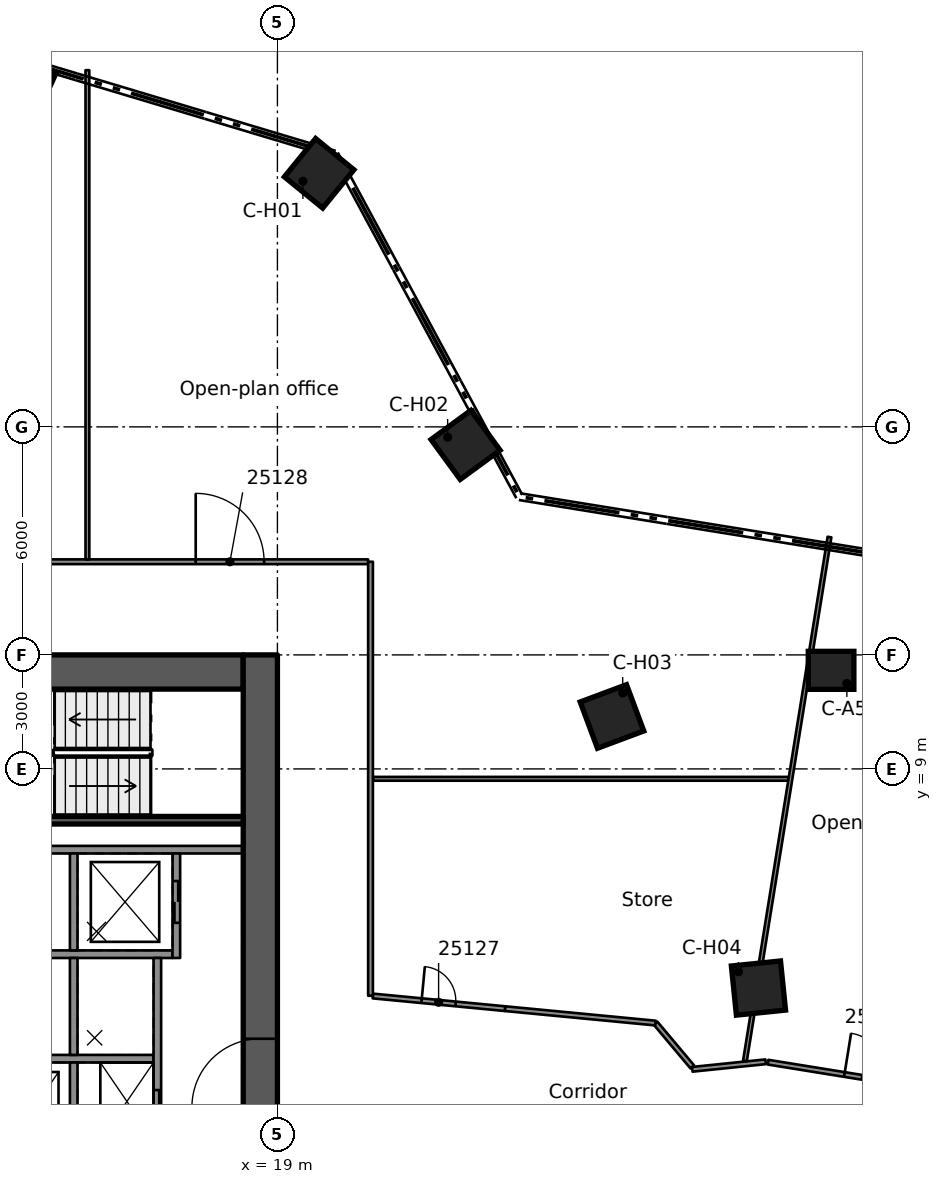
"""IFC4 building model, lengths in metres.
Left out: names, types, materials, properties, quantities, classifications, styles, units other than length and angle.
Written with IfcOpenShell. Run it as: python <this file> out.ifc"""

import sys

from ifc_helpers import new_model, si_unit, direction, frame, frame_2d, origin, origin_2d, place, context, subcontext, project, spatial, rectangle, extrude, element, fill, save


model = new_model("IFC4")
c1 = context("Model", 3, precision=1e-05, world=origin(), true_north=direction((0.0, 1.0)))
c2 = subcontext(c1, "Body", "Model", "MODEL_VIEW")
j1 = project(units=[si_unit("LENGTHUNIT", "METRE"), si_unit("PLANEANGLEUNIT", "RADIAN")], contexts=[c1])
p1 = place(None, origin())
s1 = spatial("IfcSite", under=j1, at=p1, CompositionType="ELEMENT")
p2 = place(p1, origin())
s2 = spatial("IfcBuilding", under=s1, at=p2, CompositionType="ELEMENT")
p3 = place(p2, frame((0.0, 0.0, 127.2)))
s3 = spatial("IfcBuildingStorey", under=s2, at=p3, CompositionType="ELEMENT", Elevation=127.2)
p4 = place(p3, frame((8.9, 11.55, 0.0), z_axis=(0.0, 0.0, 1.0), x_axis=(1.0, 0.0, 0.0)))
e1 = element("IfcWall", 1, at=p4, inside=s3, PredefinedType="SHEAR", context=c2, shape_type="SweptSolid", body=[
    extrude(rectangle(XDim=9.2, YDim=0.9, at=frame_2d((4.6, 0.0))), origin(), (0.0, 0.0, 1.0), 3.5),
])
p5 = place(p4, frame((3.0, 0.0, 0.0)))
e2 = element("IfcOpeningElement", 2, at=p5, cuts=e1, PredefinedType="OPENING", context=c2, shape_type="SweptSolid", body=[
    extrude(rectangle(XDim=1.1, YDim=2.1, at=frame_2d((0.55, 1.05))), frame((0.0, 0.46, 0.0), z_axis=(0.0, -1.0, 0.0), x_axis=(1.0, 0.0, 0.0)), (0.0, 0.0, 1.0), 0.92),
])
p6 = place(p4, frame((0.77, 0.0, 0.0)))
e3 = element("IfcOpeningElement", 3, at=p6, cuts=e1, PredefinedType="OPENING", context=c2, shape_type="SweptSolid", body=[
    extrude(rectangle(XDim=0.9, YDim=2.1, at=frame_2d((0.45, 1.05))), frame((0.0, 0.46, 0.0), z_axis=(0.0, -1.0, 0.0), x_axis=(1.0, 0.0, 0.0)), (0.0, 0.0, 1.0), 0.92),
])
p7 = place(p3, frame((18.55, -12.0, 0.0), z_axis=(0.0, 0.0, 1.0), x_axis=(0.0, 1.0, 0.0)))
e4 = element("IfcWall", 4, at=p7, inside=s3, PredefinedType="SHEAR", context=c2, shape_type="SweptSolid", body=[
    extrude(rectangle(XDim=24.0, YDim=0.9, at=frame_2d((12.0, 0.0))), origin(), (0.0, 0.0, 1.0), 3.5),
])
p8 = place(p7, frame((12.1, 0.0, 0.0)))
e5 = element("IfcOpeningElement", 5, at=p8, cuts=e4, PredefinedType="OPENING", context=c2, shape_type="SweptSolid", body=[
    extrude(rectangle(XDim=1.8, YDim=2.1, at=frame_2d((0.9, 1.05))), frame((0.0, 0.46, 0.0), z_axis=(0.0, -1.0, 0.0), x_axis=(1.0, 0.0, 0.0)), (0.0, 0.0, 1.0), 0.92),
])
p9 = place(p3, frame((33.569, 11.594, 0.0), z_axis=(0.0, 0.0, 1.0), x_axis=(1.0, 0.0, 0.0)))
e6 = element("IfcColumn", 6, at=p9, inside=s3, PredefinedType="COLUMN", context=c2, shape_type="SweptSolid", body=[
    extrude(rectangle(XDim=1.2, YDim=1.0, at=origin_2d()), origin(), (0.0, 0.0, 1.0), 3.5),
])
for number, where, z_axis, x_axis in (
    (7, (20.098, 24.672, 0.0), (0.0, 0.0, 1.0), (0.632, 0.775, 0.0)),
    (8, (23.951, 17.526, 0.0), (0.0, 0.0, 1.0), (0.807, 0.591, 0.0)),
    (9, (27.804, 10.38, 0.0), (0.0, 0.0, 1.0), (0.937, 0.35, 0.0)),
    (10, (31.658, 3.234, 0.0), (0.0, 0.0, 1.0), (0.995, 0.102, 0.0)),
    (11, (12.321, 27.001, 0.0), (0.0, 0.0, 1.0), (0.415, 0.91, 0.0)),
):
    element("IfcColumn", number, at=place(p3, frame(where, z_axis=z_axis, x_axis=x_axis)), inside=s3, PredefinedType="COLUMN", context=c2, shape_type="SweptSolid", body=[
        extrude(rectangle(XDim=1.3, YDim=1.3, at=origin_2d()), origin(), (0.0, 0.0, 1.0), 3.5),
    ])
p10 = place(p3, frame((11.54, 6.875, 0.0), z_axis=(0.0, 0.0, 1.0), x_axis=(1.0, 0.0, 0.0)))
e12 = element("IfcWall", 12, at=p10, inside=s3, PredefinedType="SOLIDWALL", context=c2, shape_type="SweptSolid", body=[
    extrude(rectangle(XDim=6.56, YDim=0.2, at=frame_2d((3.28, 0.0))), origin(), (0.0, 0.0, 1.0), 3.09),
])
p11 = place(p3, frame((11.54, 4.125, 0.0), z_axis=(0.0, 0.0, 1.0), x_axis=(1.0, 0.0, 0.0)))
e13 = element("IfcWall", 13, at=p11, inside=s3, PredefinedType="SOLIDWALL", context=c2, shape_type="SweptSolid", body=[
    extrude(rectangle(XDim=4.7, YDim=0.2, at=frame_2d((2.35, 0.0))), origin(), (0.0, 0.0, 1.0), 3.09),
])
p12 = place(p3, frame((11.54, 1.375, 0.0), z_axis=(0.0, 0.0, 1.0), x_axis=(1.0, 0.0, 0.0)))
e14 = element("IfcWall", 14, at=p12, inside=s3, PredefinedType="SOLIDWALL", context=c2, shape_type="SweptSolid", body=[
    extrude(rectangle(XDim=4.2, YDim=0.2, at=frame_2d((2.1, 0.0))), origin(), (0.0, 0.0, 1.0), 3.09),
])
for number, where, z_axis, x_axis in (
    (15, (13.64, 6.775, 0.0), (0.0, 0.0, 1.0), (0.0, -1.0, 0.0)),
    (16, (13.64, 4.025, 0.0), (0.0, 0.0, 1.0), (0.0, -1.0, 0.0)),
    (17, (13.64, 1.275, 0.0), (0.0, 0.0, 1.0), (0.0, -1.0, 0.0)),
):
    element("IfcWall", number, at=place(p3, frame(where, z_axis=z_axis, x_axis=x_axis)), inside=s3, PredefinedType="SOLIDWALL", context=c2, shape_type="SweptSolid", body=[
        extrude(rectangle(XDim=2.55, YDim=0.2, at=frame_2d((1.275, 0.0))), origin(), (0.0, 0.0, 1.0), 3.09),
    ])
p13 = place(p3, frame((16.34, 6.775, 0.0), z_axis=(0.0, 0.0, 1.0), x_axis=(0.0, -1.0, 0.0)))
e18 = element("IfcWall", 18, at=p13, inside=s3, PredefinedType="SOLIDWALL", context=c2, shape_type="SweptSolid", body=[
    extrude(rectangle(XDim=2.75, YDim=0.2, at=frame_2d((1.375, 0.0))), origin(), (0.0, 0.0, 1.0), 3.09),
])
p14 = place(p13, frame((0.725, 0.0, 0.0)))
e19 = element("IfcOpeningElement", 19, at=p14, cuts=e18, PredefinedType="OPENING", context=c2, shape_type="SweptSolid", body=[
    extrude(rectangle(XDim=1.1, YDim=2.1, at=frame_2d((0.55, 1.05))), frame((0.0, 0.11, 0.0), z_axis=(0.0, -1.0, 0.0), x_axis=(1.0, 0.0, 0.0)), (0.0, 0.0, 1.0), 0.22),
])
p15 = place(p3, frame((15.84, 4.025, 0.0), z_axis=(0.0, 0.0, 1.0), x_axis=(0.0, -1.0, 0.0)))
e20 = element("IfcWall", 20, at=p15, inside=s3, PredefinedType="SOLIDWALL", context=c2, shape_type="SweptSolid", body=[
    extrude(rectangle(XDim=8.05, YDim=0.2, at=frame_2d((4.025, 0.0))), origin(), (0.0, 0.0, 1.0), 3.09),
])
p16 = place(p15, frame((3.475, 0.0, 0.0)))
e21 = element("IfcOpeningElement", 21, at=p16, cuts=e20, PredefinedType="OPENING", context=c2, shape_type="SweptSolid", body=[
    extrude(rectangle(XDim=1.1, YDim=2.1, at=frame_2d((0.55, 1.05))), frame((0.0, 0.11, 0.0), z_axis=(0.0, -1.0, 0.0), x_axis=(1.0, 0.0, 0.0)), (0.0, 0.0, 1.0), 0.22),
])
p17 = place(p15, frame((6.225, 0.0, 0.0)))
e22 = element("IfcOpeningElement", 22, at=p17, cuts=e20, PredefinedType="OPENING", context=c2, shape_type="SweptSolid", body=[
    extrude(rectangle(XDim=1.1, YDim=2.1, at=frame_2d((0.55, 1.05))), frame((0.0, 0.11, 0.0), z_axis=(0.0, -1.0, 0.0), x_axis=(1.0, 0.0, 0.0)), (0.0, 0.0, 1.0), 0.22),
])
p18 = place(p3, frame((11.54, 7.65, 0.0), z_axis=(0.0, 0.0, 1.0), x_axis=(1.0, 0.0, 0.0)))
e23 = element("IfcWall", 23, at=p18, inside=s3, PredefinedType="SOLIDWALL", context=c2, shape_type="SweptSolid", body=[
    extrude(rectangle(XDim=6.56, YDim=0.2, at=frame_2d((3.28, 0.0))), origin(), (0.0, 0.0, 1.0), 3.09),
])
p19 = place(p3, frame((29.918, 1.158, 0.0), z_axis=(0.0, 0.0, 1.0), x_axis=(-0.643093382336, 0.765787765374, 0.0)))
e24 = element("IfcWall", 24, at=p19, inside=s3, PredefinedType="PARTITIONING", context=c2, shape_type="SweptSolid", body=[
    extrude(rectangle(XDim=1.508, YDim=0.125, at=frame_2d((0.754, 0.0))), origin(), (0.0, 0.0, 1.0), 3.08),
])
p20 = place(p3, frame((31.909, 1.284, 0.0), z_axis=(0.0, 0.0, 1.0), x_axis=(0.987227629246, -0.159316063386, 0.0)))
e25 = element("IfcWall", 25, at=p20, inside=s3, PredefinedType="PARTITIONING", context=c2, shape_type="SweptSolid", body=[
    extrude(rectangle(XDim=24.14, YDim=0.125, at=frame_2d((12.07, 0.0))), origin(), (0.0, 0.0, 1.0), 3.08),
])
p21 = place(p20, frame((2.038, 0.0, 0.0)))
e26 = element("IfcOpeningElement", 26, at=p21, cuts=e25, PredefinedType="OPENING", context=c2, shape_type="SweptSolid", body=[
    extrude(rectangle(XDim=1.1, YDim=2.1, at=frame_2d((0.55, 1.05))), frame((0.0, 0.073, 0.0), z_axis=(0.0, -1.0, 0.0), x_axis=(1.0, 0.0, 0.0)), (0.0, 0.0, 1.0), 0.145),
])
p22 = place(p20, frame((7.103, 0.0, 0.0)))
e27 = element("IfcOpeningElement", 27, at=p22, cuts=e25, PredefinedType="OPENING", context=c2, shape_type="SweptSolid", body=[
    extrude(rectangle(XDim=1.1, YDim=2.1, at=frame_2d((0.55, 1.05))), frame((0.0, 0.073, 0.0), z_axis=(0.0, -1.0, 0.0), x_axis=(1.0, 0.0, 0.0)), (0.0, 0.0, 1.0), 0.145),
])
p23 = place(p20, frame((12.653, 0.0, 0.0)))
e28 = element("IfcOpeningElement", 28, at=p23, cuts=e25, PredefinedType="OPENING", context=c2, shape_type="SweptSolid", body=[
    extrude(rectangle(XDim=0.9, YDim=2.1, at=frame_2d((0.45, 1.05))), frame((0.0, 0.073, 0.0), z_axis=(0.0, -1.0, 0.0), x_axis=(1.0, 0.0, 0.0)), (0.0, 0.0, 1.0), 0.145),
])
p24 = place(p20, frame((22.303, 0.0, 0.0)))
e29 = element("IfcOpeningElement", 29, at=p24, cuts=e25, PredefinedType="OPENING", context=c2, shape_type="SweptSolid", body=[
    extrude(rectangle(XDim=0.9, YDim=2.1, at=frame_2d((0.45, 1.05))), frame((0.0, 0.073, 0.0), z_axis=(0.0, -1.0, 0.0), x_axis=(1.0, 0.0, 0.0)), (0.0, 0.0, 1.0), 0.145),
])
p25 = place(p3, frame((24.989, 2.692, 0.0), z_axis=(0.0, 0.0, 1.0), x_axis=(0.995451221245, -0.095272588516, 0.0)))
e30 = element("IfcWall", 30, at=p25, inside=s3, PredefinedType="PARTITIONING", context=c2, shape_type="SweptSolid", body=[
    extrude(rectangle(XDim=3.977, YDim=0.125, at=frame_2d((1.989, 0.0))), origin(), (0.0, 0.0, 1.0), 3.08),
])
p26 = place(p3, frame((21.512, 3.025, 0.0), z_axis=(0.0, 0.0, 1.0), x_axis=(0.995445071108, -0.095336826077, 0.0)))
e31 = element("IfcWall", 31, at=p26, inside=s3, PredefinedType="PARTITIONING", context=c2, shape_type="SweptSolid", body=[
    extrude(rectangle(XDim=3.493, YDim=0.125, at=frame_2d((1.747, 0.0))), origin(), (0.0, 0.0, 1.0), 3.08),
])
p27 = place(p26, frame((1.288, 0.0, 0.0)))
e32 = element("IfcOpeningElement", 32, at=p27, cuts=e31, PredefinedType="OPENING", context=c2, shape_type="SweptSolid", body=[
    extrude(rectangle(XDim=0.9, YDim=2.1, at=frame_2d((0.45, 1.05))), frame((0.0, 0.073, 0.0), z_axis=(0.0, -1.0, 0.0), x_axis=(1.0, 0.0, 0.0)), (0.0, 0.0, 1.0), 0.145),
])
p28 = place(p3, frame((21.512, 8.74, 0.0), z_axis=(0.0, 0.0, 1.0), x_axis=(1.0, 0.0, 0.0)))
e33 = element("IfcWall", 33, at=p28, inside=s3, PredefinedType="PARTITIONING", context=c2, shape_type="SweptSolid", body=[
    extrude(rectangle(XDim=10.939, YDim=0.1, at=frame_2d((5.469, 0.0))), origin(), (0.0, 0.0, 1.0), 3.08),
])
p29 = place(p3, frame((10.391, 14.451, 0.0), z_axis=(0.0, 0.0, 1.0), x_axis=(1.0, 0.0, 0.0)))
e34 = element("IfcWall", 34, at=p29, inside=s3, PredefinedType="PARTITIONING", context=c2, shape_type="SweptSolid", body=[
    extrude(rectangle(XDim=10.996, YDim=0.125, at=frame_2d((5.498, 0.0))), origin(), (0.0, 0.0, 1.0), 3.08),
])
p30 = place(p29, frame((6.459, 0.0, 0.0)))
e35 = element("IfcOpeningElement", 35, at=p30, cuts=e34, PredefinedType="OPENING", context=c2, shape_type="SweptSolid", body=[
    extrude(rectangle(XDim=1.8, YDim=2.1, at=frame_2d((0.9, 1.05))), frame((0.0, 0.073, 0.0), z_axis=(0.0, -1.0, 0.0), x_axis=(1.0, 0.0, 0.0)), (0.0, 0.0, 1.0), 0.145),
])
p31 = place(p3, frame((31.847, 1.294, 0.0), z_axis=(0.0, 0.0, 1.0), x_axis=(-0.9947784907, -0.102057603537, 0.0)))
e36 = element("IfcWall", 36, at=p31, inside=s3, PredefinedType="PARTITIONING", context=c2, shape_type="SweptSolid", body=[
    extrude(rectangle(XDim=1.94, YDim=0.125, at=frame_2d((0.97, 0.0))), origin(), (0.0, 0.0, 1.0), 3.08),
])
p32 = place(p3, frame((31.302, 1.314, 0.0), z_axis=(0.0, 0.0, 1.0), x_axis=(0.159328073175, 0.987225691065, 0.0)))
e37 = element("IfcWall", 37, at=p32, inside=s3, PredefinedType="PARTITIONING", context=c2, shape_type="SweptSolid", body=[
    extrude(rectangle(XDim=13.966, YDim=0.1, at=frame_2d((6.983, 0.0))), origin(), (0.0, 0.0, 1.0), 3.08),
])
p33 = place(p3, frame((21.45, 3.031, 0.0), z_axis=(0.0, 0.0, 1.0), x_axis=(0.0, 1.0, 0.0)))
e38 = element("IfcWall", 38, at=p33, inside=s3, PredefinedType="PARTITIONING", context=c2, shape_type="SweptSolid", body=[
    extrude(rectangle(XDim=11.42, YDim=0.125, at=frame_2d((5.71, 0.0))), origin(), (0.0, 0.0, 1.0), 3.08),
])
p34 = place(p3, frame((14.0, 14.514, 0.0), z_axis=(0.0, 0.0, 1.0), x_axis=(0.0, 1.0, 0.0)))
e39 = element("IfcWall", 39, at=p34, inside=s3, PredefinedType="PARTITIONING", context=c2, shape_type="SweptSolid", body=[
    extrude(rectangle(XDim=12.871, YDim=0.1, at=frame_2d((6.436, 0.0))), origin(), (0.0, 0.0, 1.0), 3.08),
])
p35 = place(p14, origin())
e40 = element("IfcDoor", 40, at=p35, inside=s3, OperationType="DOUBLE_DOOR_SLIDING", PredefinedType="DOOR", context=c2, shape_type="SweptSolid", body=[
    extrude(rectangle(XDim=1.1, YDim=2.1, at=frame_2d((0.55, 1.05))), frame((0.0, 0.025, 0.0), z_axis=(0.0, -1.0, 0.0), x_axis=(1.0, 0.0, 0.0)), (0.0, 0.0, 1.0), 0.05),
])
fill(e19, e40)
p36 = place(p16, origin())
e41 = element("IfcDoor", 41, at=p36, inside=s3, OperationType="DOUBLE_DOOR_SLIDING", PredefinedType="DOOR", context=c2, shape_type="SweptSolid", body=[
    extrude(rectangle(XDim=1.1, YDim=2.1, at=frame_2d((0.55, 1.05))), frame((0.0, 0.025, 0.0), z_axis=(0.0, -1.0, 0.0), x_axis=(1.0, 0.0, 0.0)), (0.0, 0.0, 1.0), 0.05),
])
fill(e21, e41)
p37 = place(p8, origin())
e42 = element("IfcDoor", 42, at=p37, inside=s3, OperationType="SINGLE_SWING_RIGHT", PredefinedType="DOOR", context=c2, shape_type="SweptSolid", body=[
    extrude(rectangle(XDim=1.8, YDim=2.1, at=frame_2d((0.9, 1.05))), frame((0.0, 0.025, 0.0), z_axis=(0.0, -1.0, 0.0), x_axis=(1.0, 0.0, 0.0)), (0.0, 0.0, 1.0), 0.05),
])
fill(e5, e42)
p38 = place(p21, origin())
e43 = element("IfcDoor", 43, at=p38, inside=s3, OperationType="SINGLE_SWING_LEFT", PredefinedType="DOOR", context=c2, shape_type="SweptSolid", body=[
    extrude(rectangle(XDim=1.1, YDim=2.1, at=frame_2d((0.55, 1.05))), frame((0.0, 0.025, 0.0), z_axis=(0.0, -1.0, 0.0), x_axis=(1.0, 0.0, 0.0)), (0.0, 0.0, 1.0), 0.05),
])
fill(e26, e43)
p39 = place(p27, origin())
e44 = element("IfcDoor", 44, at=p39, inside=s3, OperationType="SINGLE_SWING_LEFT", PredefinedType="DOOR", context=c2, shape_type="SweptSolid", body=[
    extrude(rectangle(XDim=0.9, YDim=2.1, at=frame_2d((0.45, 1.05))), frame((0.0, 0.025, 0.0), z_axis=(0.0, -1.0, 0.0), x_axis=(1.0, 0.0, 0.0)), (0.0, 0.0, 1.0), 0.05),
])
fill(e32, e44)
p40 = place(p30, origin())
e45 = element("IfcDoor", 45, at=p40, inside=s3, OperationType="DOUBLE_DOOR_SINGLE_SWING", PredefinedType="DOOR", context=c2, shape_type="SweptSolid", body=[
    extrude(rectangle(XDim=1.8, YDim=2.1, at=frame_2d((0.9, 1.05))), frame((0.0, 0.025, 0.0), z_axis=(0.0, -1.0, 0.0), x_axis=(1.0, 0.0, 0.0)), (0.0, 0.0, 1.0), 0.05),
])
fill(e35, e45)
save(model, sys.argv[1])
